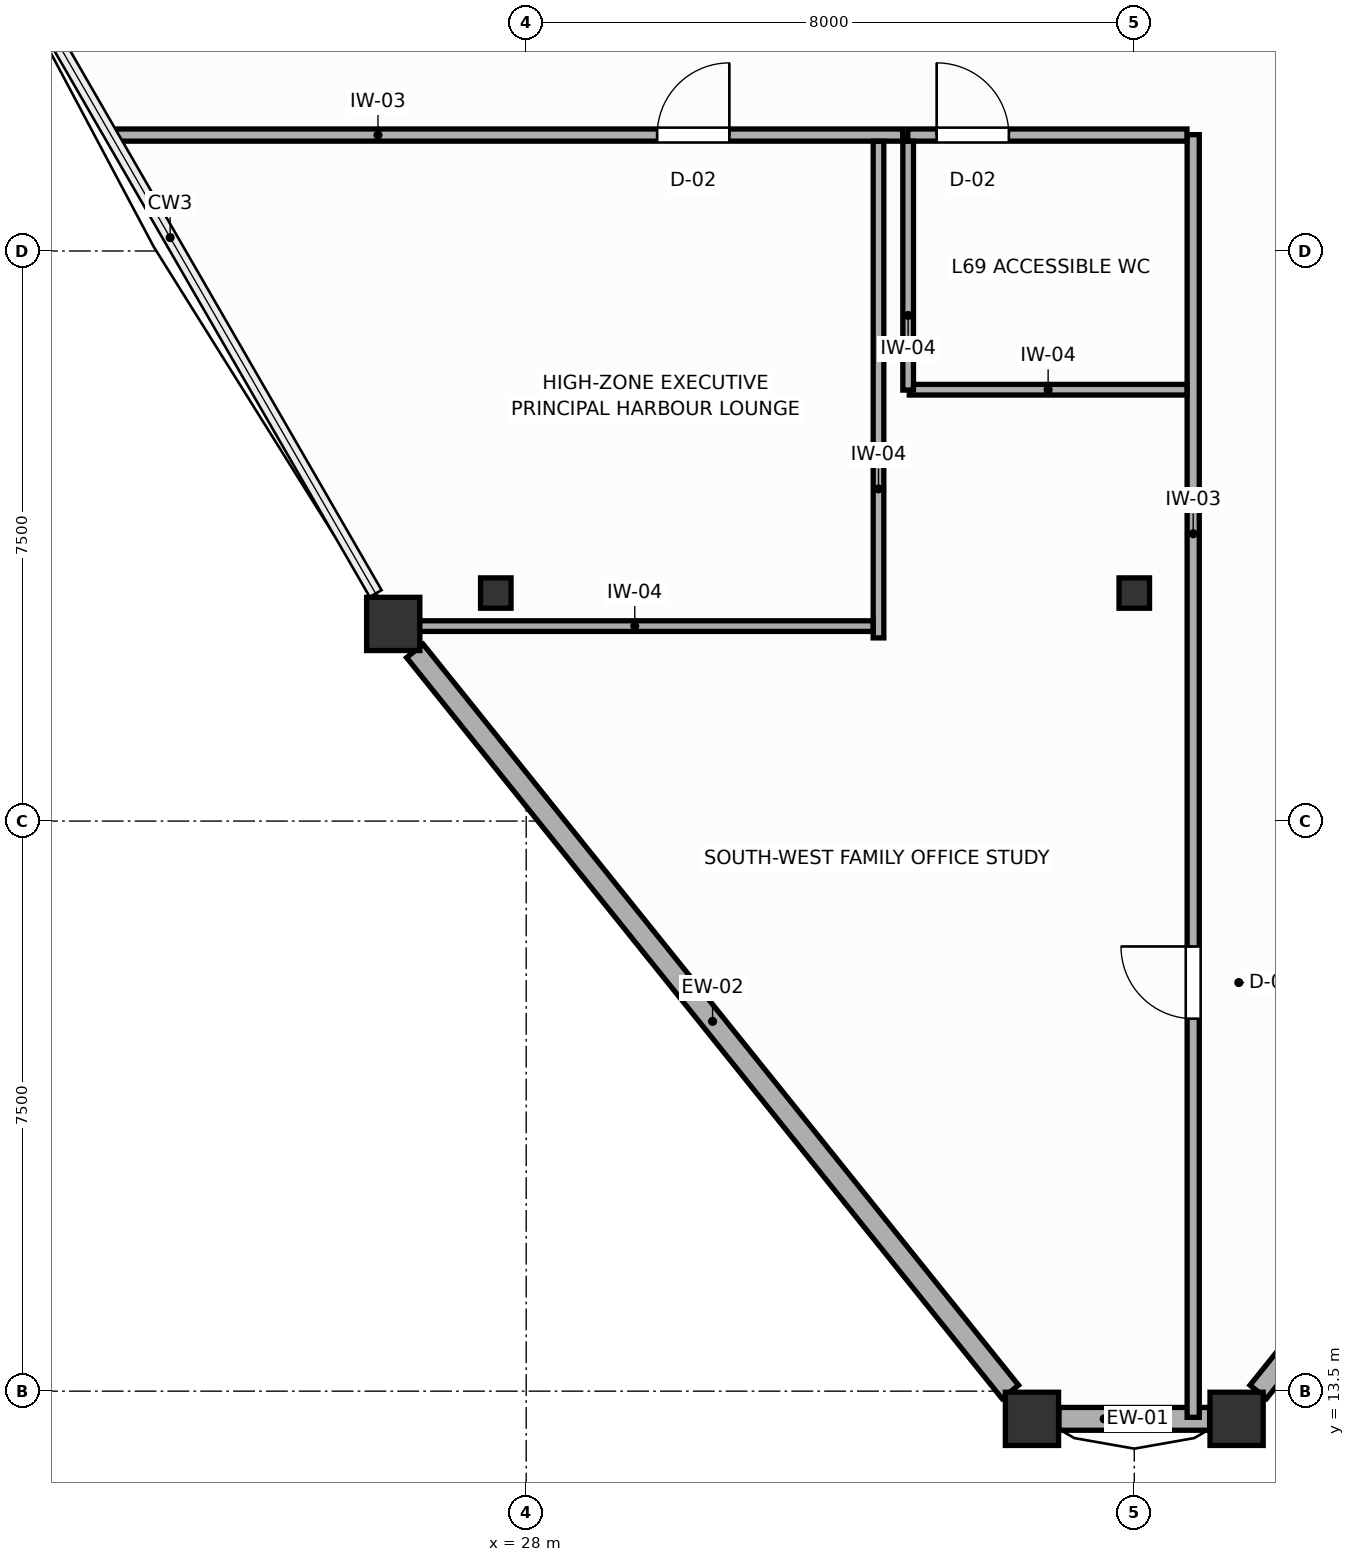
"""IFC4 building model, lengths in metres.
Left out: names, types, materials, properties, quantities, classifications, styles, units other than length and angle.
Written with IfcOpenShell. Run it as: python <this file> out.ifc"""

import sys

from ifc_helpers import new_model, si_unit, direction, frame, frame_2d, origin, origin_2d, place, context, subcontext, project, spatial, rectangle, i_section, extrude, source, transform, mapped, element, fill, save


model = new_model("IFC4")
c1 = context("Model", 3, precision=1e-05, world=origin(), true_north=direction((0.0, 1.0)))
c2 = subcontext(c1, "Body", "Model", "MODEL_VIEW")
j1 = project(units=[si_unit("LENGTHUNIT", "METRE"), si_unit("PLANEANGLEUNIT", "RADIAN")], contexts=[c1])
p1 = place(None, origin())
s1 = spatial("IfcSite", under=j1, at=p1, CompositionType="ELEMENT")
p2 = place(p1, origin())
s2 = spatial("IfcBuilding", under=s1, at=p2, CompositionType="ELEMENT")
p3 = place(p2, frame((0.0, 0.0, 264.6)))
s3 = spatial("IfcBuildingStorey", under=s2, at=p3, CompositionType="ELEMENT", Elevation=264.6)
m1 = source(origin(), c2, "Body", "SweptSolid", [
    extrude(i_section(OverallWidth=0.401, OverallDepth=0.399, WebThickness=0.022, FlangeThickness=0.036, FilletRadius=0.015, at=origin_2d()), origin(), (0.0, 0.0, 1.0), 3.6),
])
for number, where, z_axis, x_axis in (
    (1, (27.6, 24.0, 0.0), (0.0, 0.0, 1.0), (1.0, 0.0, 0.0)),
    (2, (36.0, 24.0, 0.0), (0.0, 0.0, 1.0), (1.0, 0.0, 0.0)),
):
    element("IfcColumn", number, at=place(p3, frame(where, z_axis=z_axis, x_axis=x_axis)), inside=s3, PredefinedType="COLUMN", context=c2, shape_type="MappedRepresentation", body=[
        mapped(m1, transform((0.0, 0.0, 0.0), scale=1.0)),
    ])
m2 = source(origin(), c2, "Body", "SweptSolid", [
    extrude(rectangle(XDim=0.7, YDim=0.7, at=origin_2d()), origin(), (0.0, 0.0, 1.0), 3.6),
])
for number, where, z_axis, x_axis in (
    (3, (26.25, 23.594, 0.0), (0.0, 0.0, 1.0), (1.0, 0.0, 0.0)),
    (4, (34.654, 13.135, 0.0), (0.0, 0.0, 1.0), (1.0, 0.0, 0.0)),
    (5, (37.346, 13.135, 0.0), (0.0, 0.0, 1.0), (1.0, 0.0, 0.0)),
):
    element("IfcColumn", number, at=place(p3, frame(where, z_axis=z_axis, x_axis=x_axis)), inside=s3, PredefinedType="COLUMN", context=c2, shape_type="MappedRepresentation", body=[
        mapped(m2, transform((0.0, 0.0, 0.0), scale=1.0)),
    ])
p4 = place(p3, frame((26.536, 23.239, 0.0), z_axis=(0.0, 0.0, 1.0), x_axis=(0.626367381926, -0.779528000048, 0.0)))
e6 = element("IfcWall", 6, at=p4, inside=s3, PredefinedType="SOLIDWALL", context=c2, shape_type="SweptSolid", body=[
    extrude(rectangle(XDim=12.505, YDim=0.28, at=frame_2d((6.252, 0.0))), origin(), (0.0, 0.0, 1.0), 3.08),
])
p5 = place(p3, frame((35.009, 13.135, 0.0), z_axis=(0.0, 0.0, 1.0), x_axis=(1.0, 0.0, 0.0)))
e7 = element("IfcWall", 7, at=p5, inside=s3, PredefinedType="SOLIDWALL", context=c2, shape_type="SweptSolid", body=[
    extrude(rectangle(XDim=1.982, YDim=0.3, at=frame_2d((0.991, 0.0))), origin(), (0.0, 0.0, 1.0), 3.08),
])
p6 = place(p3, frame((37.632, 13.49, 0.0), z_axis=(0.0, 0.0, 1.0), x_axis=(0.626367381926, 0.779528000048, 0.0)))
e8 = element("IfcWall", 8, at=p6, inside=s3, PredefinedType="SOLIDWALL", context=c2, shape_type="SweptSolid", body=[
    extrude(rectangle(XDim=12.505, YDim=0.28, at=frame_2d((6.252, 0.0))), origin(), (0.0, 0.0, 1.0), 3.05),
])
p7 = place(p3, frame((36.775, 13.156, 0.0), z_axis=(0.0, 0.0, 1.0), x_axis=(0.0, 1.0, 0.0)))
e9 = element("IfcWall", 9, at=p7, inside=s3, PredefinedType="PARTITIONING", context=c2, shape_type="SweptSolid", body=[
    extrude(rectangle(XDim=16.875, YDim=0.16, at=frame_2d((8.437, 0.0))), origin(), (0.0, 0.0, 1.0), 3.08),
])
p8 = place(p7, frame((5.245, 0.0, 0.0)))
e10 = element("IfcOpeningElement", 10, at=p8, cuts=e9, PredefinedType="OPENING", context=c2, shape_type="SweptSolid", body=[
    extrude(rectangle(XDim=0.95, YDim=2.05, at=frame_2d((0.475, 1.025))), frame((0.0, 0.09, 0.0), z_axis=(0.0, -1.0, 0.0), x_axis=(1.0, 0.0, 0.0)), (0.0, 0.0, 1.0), 0.18),
])
p9 = place(p3, frame((22.557, 30.025, 0.0), z_axis=(0.0, 0.0, 1.0), x_axis=(1.0, 0.0, 0.0)))
e11 = element("IfcWall", 11, at=p9, inside=s3, PredefinedType="PARTITIONING", context=c2, shape_type="SweptSolid", body=[
    extrude(rectangle(XDim=10.396, YDim=0.16, at=frame_2d((5.198, 0.0))), origin(), (0.0, 0.0, 1.0), 3.41),
])
p10 = place(p9, frame((7.166, 0.0, 0.0)))
e12 = element("IfcOpeningElement", 12, at=p10, cuts=e11, PredefinedType="OPENING", context=c2, shape_type="SweptSolid", body=[
    extrude(rectangle(XDim=0.95, YDim=2.05, at=frame_2d((0.475, 1.025))), frame((0.0, 0.09, 0.0), z_axis=(0.0, -1.0, 0.0), x_axis=(1.0, 0.0, 0.0)), (0.0, 0.0, 1.0), 0.18),
])
p11 = place(p3, frame((33.02, 30.025, 0.0), z_axis=(0.0, 0.0, 1.0), x_axis=(1.0, 0.0, 0.0)))
e13 = element("IfcWall", 13, at=p11, inside=s3, PredefinedType="PARTITIONING", context=c2, shape_type="SweptSolid", body=[
    extrude(rectangle(XDim=3.673, YDim=0.16, at=frame_2d((1.836, 0.0))), origin(), (0.0, 0.0, 1.0), 3.41),
])
p12 = place(p11, frame((0.38, 0.0, 0.0)))
e14 = element("IfcOpeningElement", 14, at=p12, cuts=e13, PredefinedType="OPENING", context=c2, shape_type="SweptSolid", body=[
    extrude(rectangle(XDim=0.95, YDim=2.05, at=frame_2d((0.475, 1.025))), frame((0.0, 0.09, 0.0), z_axis=(0.0, -1.0, 0.0), x_axis=(1.0, 0.0, 0.0)), (0.0, 0.0, 1.0), 0.18),
])
p13 = place(p3, frame((32.635, 23.41, 0.0), z_axis=(0.0, 0.0, 1.0), x_axis=(0.0, 1.0, 0.0)))
e15 = element("IfcWall", 15, at=p13, inside=s3, PredefinedType="PARTITIONING", context=c2, shape_type="SweptSolid", body=[
    extrude(rectangle(XDim=6.533, YDim=0.14, at=frame_2d((3.267, 0.0))), origin(), (0.0, 0.0, 1.0), 3.41),
])
p14 = place(p3, frame((26.293, 23.565, 0.0), z_axis=(0.0, 0.0, 1.0), x_axis=(1.0, 0.0, 0.0)))
e16 = element("IfcWall", 16, at=p14, inside=s3, PredefinedType="PARTITIONING", context=c2, shape_type="SweptSolid", body=[
    extrude(rectangle(XDim=6.27, YDim=0.14, at=frame_2d((3.135, 0.0))), origin(), (0.0, 0.0, 1.0), 3.08),
])
p15 = place(p3, frame((33.04, 26.675, 0.0), z_axis=(0.0, 0.0, 1.0), x_axis=(1.0, 0.0, 0.0)))
e17 = element("IfcWall", 17, at=p15, inside=s3, PredefinedType="PARTITIONING", context=c2, shape_type="SweptSolid", body=[
    extrude(rectangle(XDim=3.653, YDim=0.14, at=frame_2d((1.827, 0.0))), origin(), (0.0, 0.0, 1.0), 3.41),
])
p16 = place(p3, frame((33.025, 26.67, 0.0), z_axis=(0.0, 0.0, 1.0), x_axis=(0.0, 1.0, 0.0)))
e18 = element("IfcWall", 18, at=p16, inside=s3, PredefinedType="PARTITIONING", context=c2, shape_type="SweptSolid", body=[
    extrude(rectangle(XDim=3.273, YDim=0.14, at=frame_2d((1.637, 0.0))), origin(), (0.0, 0.0, 1.0), 3.41),
])
p17 = place(p8, origin())
e19 = element("IfcDoor", 19, at=p17, inside=s3, OperationType="SINGLE_SWING_RIGHT", PredefinedType="DOOR", context=c2, shape_type="SweptSolid", body=[
    extrude(rectangle(XDim=0.95, YDim=2.05, at=frame_2d((0.475, 1.025))), frame((0.0, 0.025, 0.0), z_axis=(0.0, -1.0, 0.0), x_axis=(1.0, 0.0, 0.0)), (0.0, 0.0, 1.0), 0.05),
])
fill(e10, e19)
p18 = place(p10, origin())
e20 = element("IfcDoor", 20, at=p18, inside=s3, OperationType="SINGLE_SWING_RIGHT", PredefinedType="DOOR", context=c2, shape_type="SweptSolid", body=[
    extrude(rectangle(XDim=0.95, YDim=2.05, at=frame_2d((0.475, 1.025))), frame((0.0, 0.025, 0.0), z_axis=(0.0, -1.0, 0.0), x_axis=(1.0, 0.0, 0.0)), (0.0, 0.0, 1.0), 0.05),
])
fill(e12, e20)
p19 = place(p12, origin())
e21 = element("IfcDoor", 21, at=p19, inside=s3, OperationType="SINGLE_SWING_LEFT", PredefinedType="DOOR", context=c2, shape_type="SweptSolid", body=[
    extrude(rectangle(XDim=0.95, YDim=2.05, at=frame_2d((0.475, 1.025))), frame((0.0, 0.025, 0.0), z_axis=(0.0, -1.0, 0.0), x_axis=(1.0, 0.0, 0.0)), (0.0, 0.0, 1.0), 0.05),
])
fill(e14, e21)
save(model, sys.argv[1])
